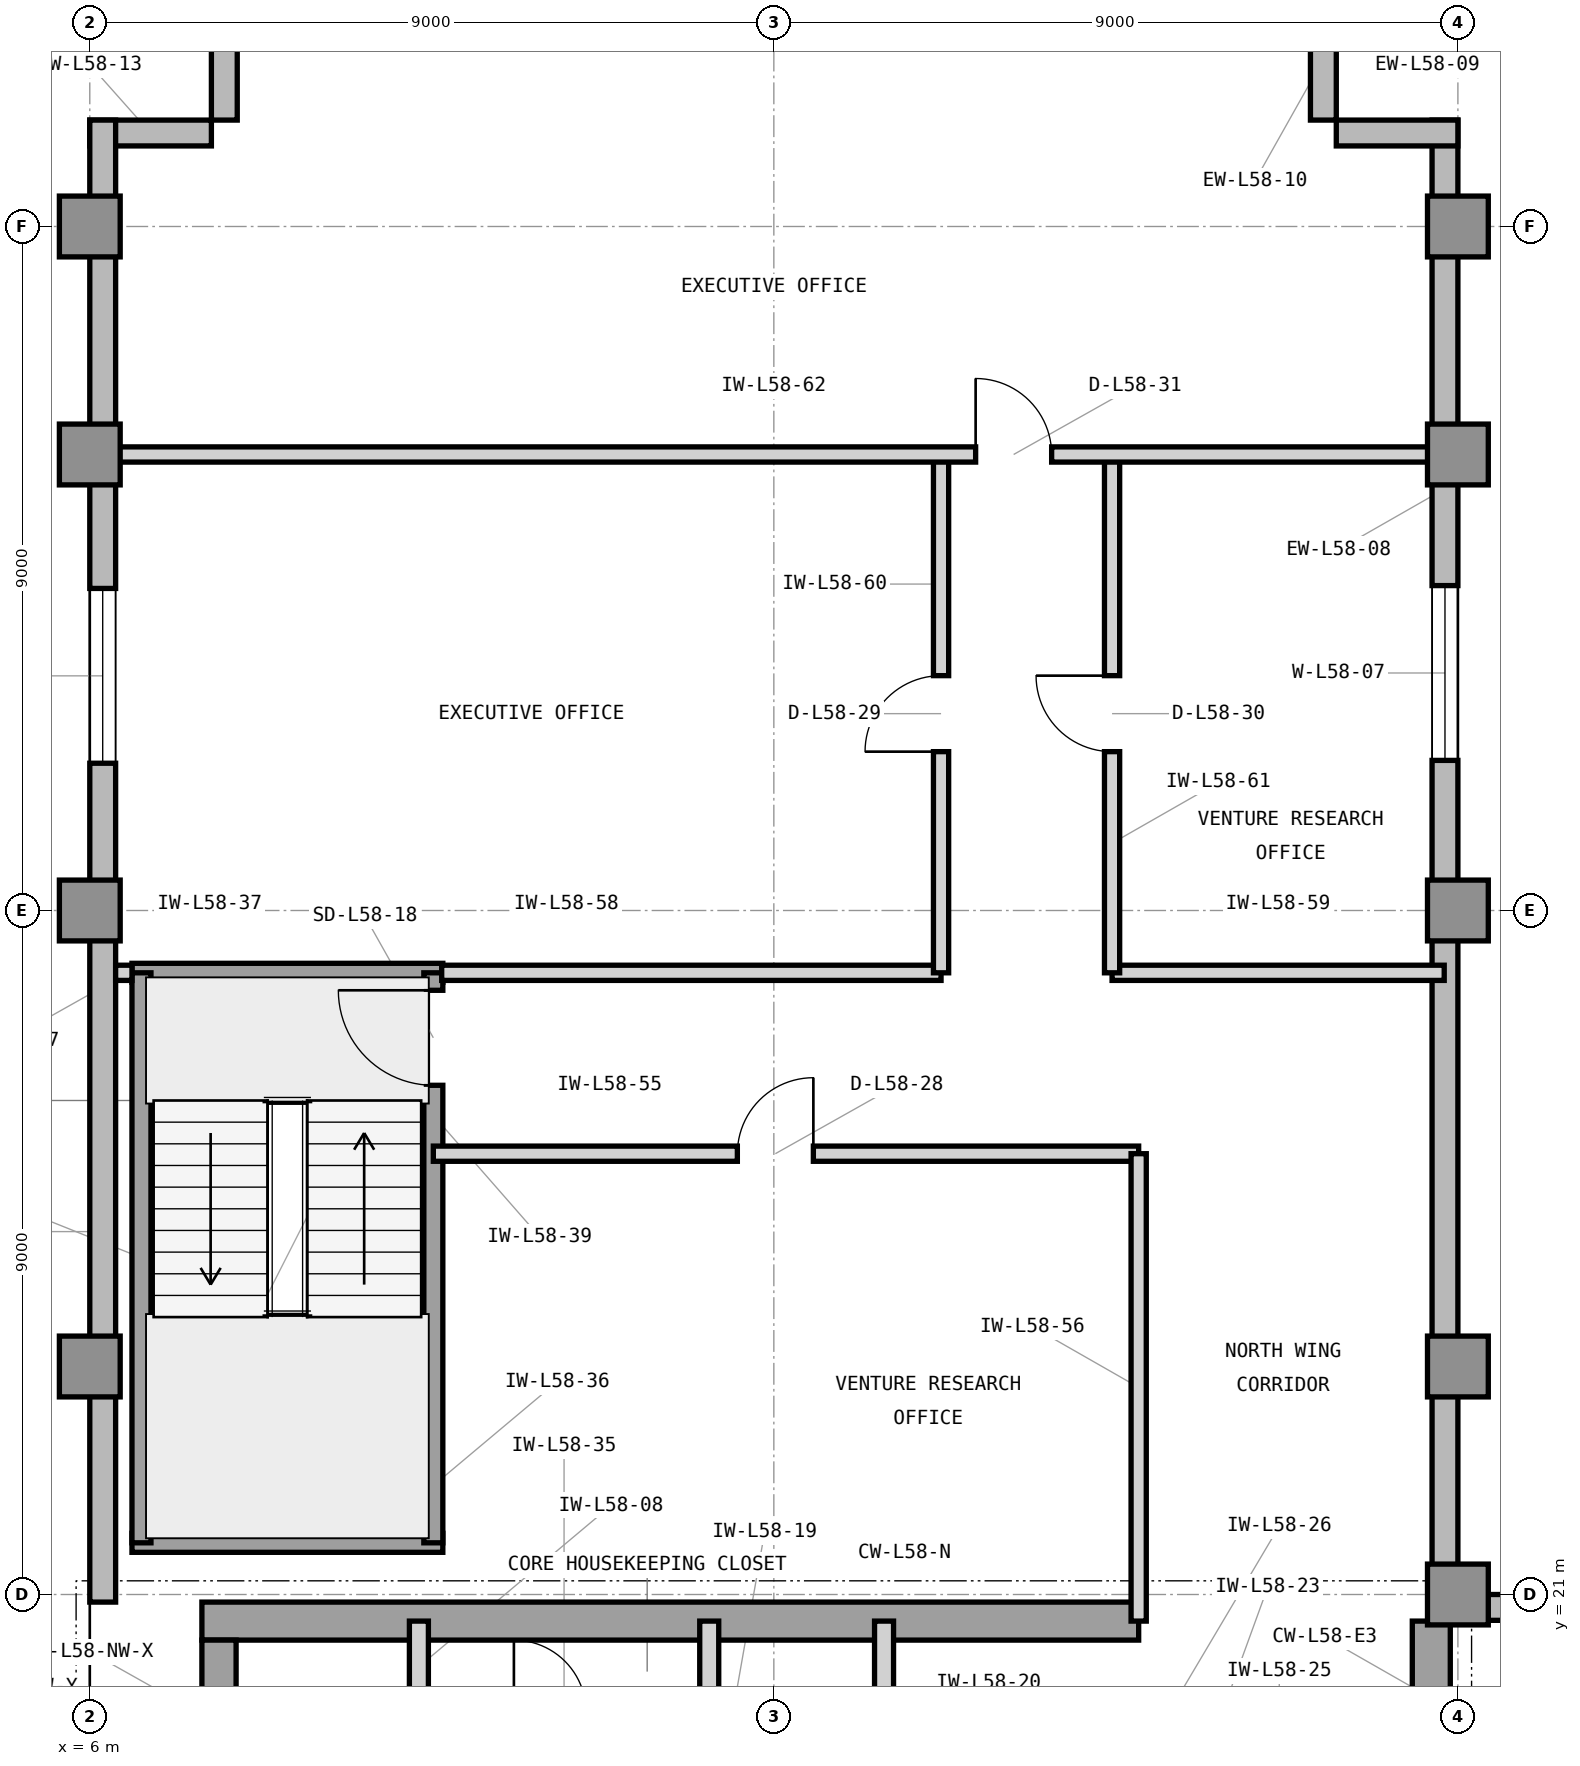
"""IFC4 building model, lengths in metres.
Left out: names, types, materials, properties, quantities, classifications, styles, units other than length and angle.
Written with IfcOpenShell. Run it as: python <this file> out.ifc"""

import sys

from ifc_helpers import new_model, si_unit, direction, frame, frame_2d, origin, origin_2d, place, context, subcontext, project, spatial, rectangle, extrude, element, fill, save


model = new_model("IFC4")
c1 = context("Model", 3, precision=1e-05, world=origin(), true_north=direction((0.0, 1.0)))
c2 = subcontext(c1, "Body", "Model", "MODEL_VIEW")
j1 = project(units=[si_unit("LENGTHUNIT", "METRE"), si_unit("PLANEANGLEUNIT", "RADIAN")], contexts=[c1])
p1 = place(None, origin())
s1 = spatial("IfcSite", under=j1, at=p1, CompositionType="ELEMENT")
p2 = place(p1, origin())
s2 = spatial("IfcBuilding", under=s1, at=p2, CompositionType="ELEMENT")
p3 = place(p2, frame((0.0, 0.0, 239.1)))
s3 = spatial("IfcBuildingStorey", under=s2, at=p3, CompositionType="ELEMENT", Elevation=239.1)
p4 = place(p3, frame((7.475, 20.65, 0.0), z_axis=(0.0, 0.0, 1.0), x_axis=(1.0, 0.0, 0.0)))
e1 = element("IfcWall", 1, at=p4, inside=s3, PredefinedType="SHEAR", context=c2, shape_type="SweptSolid", body=[
    extrude(rectangle(XDim=12.325, YDim=0.5, at=frame_2d((6.163, 0.0))), origin(), (0.0, 0.0, 1.0), 3.9),
])
p5 = place(p3, frame((23.65, 16.6, 0.0), z_axis=(0.0, 0.0, 1.0), x_axis=(0.0, 1.0, 0.0)))
e2 = element("IfcWall", 2, at=p5, inside=s3, PredefinedType="SHEAR", context=c2, shape_type="SweptSolid", body=[
    extrude(rectangle(XDim=4.05, YDim=0.5, at=frame_2d((2.025, 0.0))), origin(), (0.0, 0.0, 1.0), 3.9),
])
p6 = place(p3, frame((7.7, 19.575, 0.0), z_axis=(0.0, 0.0, 1.0), x_axis=(0.0, 1.0, 0.0)))
e3 = element("IfcWall", 3, at=p6, inside=s3, PredefinedType="SHEAR", context=c2, shape_type="SweptSolid", body=[
    extrude(rectangle(XDim=0.825, YDim=0.45, at=frame_2d((0.413, 0.0))), origin(), (0.0, 0.0, 1.0), 3.9),
])
for number, where, z_axis, x_axis in (
    (4, (24.0, 21.0, 0.0), (0.0, 0.0, 1.0), (1.0, 0.0, 0.0)),
    (5, (6.0, 24.0, 0.0), (0.0, 0.0, 1.0), (1.0, 0.0, 0.0)),
    (6, (24.0, 24.0, 0.0), (0.0, 0.0, 1.0), (1.0, 0.0, 0.0)),
    (7, (6.0, 30.0, 0.0), (0.0, 0.0, 1.0), (1.0, 0.0, 0.0)),
    (8, (24.0, 30.0, 0.0), (0.0, 0.0, 1.0), (1.0, 0.0, 0.0)),
    (9, (6.0, 36.0, 0.0), (0.0, 0.0, 1.0), (1.0, 0.0, 0.0)),
    (10, (24.0, 36.0, 0.0), (0.0, 0.0, 1.0), (1.0, 0.0, 0.0)),
    (11, (6.0, 39.0, 0.0), (0.0, 0.0, 1.0), (1.0, 0.0, 0.0)),
    (12, (24.0, 39.0, 0.0), (0.0, 0.0, 1.0), (1.0, 0.0, 0.0)),
):
    element("IfcColumn", number, at=place(p3, frame(where, z_axis=z_axis, x_axis=x_axis)), inside=s3, PredefinedType="COLUMN", context=c2, shape_type="SweptSolid", body=[
        extrude(rectangle(XDim=0.8, YDim=0.8, at=origin_2d()), origin(), (0.0, 0.0, 1.0), 3.9),
    ])
p7 = place(p3, frame((52.4, 20.83, 0.0), z_axis=(0.0, 0.0, 1.0), x_axis=(-1.0, 0.0, 0.0)))
e13 = element("IfcWall", 13, at=p7, inside=s3, PredefinedType="STANDARD", context=c2, shape_type="SweptSolid", body=[
    extrude(rectangle(XDim=28.4, YDim=0.34, at=frame_2d((14.2, 0.0))), origin(), (0.0, 0.0, 1.0), 3.7),
])
p8 = place(p7, frame((5.95, 0.0, 0.9)))
e14 = element("IfcOpeningElement", 14, at=p8, cuts=e13, PredefinedType="OPENING", context=c2, shape_type="SweptSolid", body=[
    extrude(rectangle(XDim=2.3, YDim=2.2, at=frame_2d((1.15, 1.1))), frame((0.0, 0.18, 0.0), z_axis=(0.0, -1.0, 0.0), x_axis=(1.0, 0.0, 0.0)), (0.0, 0.0, 1.0), 0.36),
])
p9 = place(p7, frame((15.417, 0.0, 0.9)))
e15 = element("IfcOpeningElement", 15, at=p9, cuts=e13, PredefinedType="OPENING", context=c2, shape_type="SweptSolid", body=[
    extrude(rectangle(XDim=2.3, YDim=2.2, at=frame_2d((1.15, 1.1))), frame((0.0, 0.18, 0.0), z_axis=(0.0, -1.0, 0.0), x_axis=(1.0, 0.0, 0.0)), (0.0, 0.0, 1.0), 0.36),
])
p10 = place(p7, frame((26.096, 0.0, 0.9)))
e16 = element("IfcOpeningElement", 16, at=p10, cuts=e13, PredefinedType="OPENING", context=c2, shape_type="SweptSolid", body=[
    extrude(rectangle(XDim=1.6, YDim=2.2, at=frame_2d((0.8, 1.1))), frame((0.0, 0.18, 0.0), z_axis=(0.0, -1.0, 0.0), x_axis=(1.0, 0.0, 0.0)), (0.0, 0.0, 1.0), 0.36),
])
p11 = place(p3, frame((23.83, 21.0, 0.0), z_axis=(0.0, 0.0, 1.0), x_axis=(0.0, 1.0, 0.0)))
e17 = element("IfcWall", 17, at=p11, inside=s3, PredefinedType="STANDARD", context=c2, shape_type="SweptSolid", body=[
    extrude(rectangle(XDim=19.4, YDim=0.34, at=frame_2d((9.7, 0.0))), origin(), (0.0, 0.0, 1.0), 3.7),
])
p12 = place(p11, frame((10.975, 0.0, 0.9)))
e18 = element("IfcOpeningElement", 18, at=p12, cuts=e17, PredefinedType="OPENING", context=c2, shape_type="SweptSolid", body=[
    extrude(rectangle(XDim=2.3, YDim=2.2, at=frame_2d((1.15, 1.1))), frame((0.0, 0.18, 0.0), z_axis=(0.0, -1.0, 0.0), x_axis=(1.0, 0.0, 0.0)), (0.0, 0.0, 1.0), 0.36),
])
for number, where, z_axis, x_axis in (
    (19, (24.0, 40.23, 0.0), (0.0, 0.0, 1.0), (-1.0, 0.0, 0.0)),
    (20, (22.23, 40.4, 0.0), (0.0, 0.0, 1.0), (0.0, 1.0, 0.0)),
    (21, (7.77, 42.0, 0.0), (0.0, 0.0, 1.0), (0.0, -1.0, 0.0)),
    (22, (7.6, 40.23, 0.0), (0.0, 0.0, 1.0), (-1.0, 0.0, 0.0)),
):
    element("IfcWall", number, at=place(p3, frame(where, z_axis=z_axis, x_axis=x_axis)), inside=s3, PredefinedType="STANDARD", context=c2, shape_type="SweptSolid", body=[
        extrude(rectangle(XDim=1.6, YDim=0.34, at=frame_2d((0.8, 0.0))), origin(), (0.0, 0.0, 1.0), 3.7),
    ])
p13 = place(p3, frame((6.17, 40.4, 0.0), z_axis=(0.0, 0.0, 1.0), x_axis=(0.0, -1.0, 0.0)))
e23 = element("IfcWall", 23, at=p13, inside=s3, PredefinedType="STANDARD", context=c2, shape_type="SweptSolid", body=[
    extrude(rectangle(XDim=19.5, YDim=0.34, at=frame_2d((9.75, 0.0))), origin(), (0.0, 0.0, 1.0), 3.7),
])
p14 = place(p13, frame((6.163, 0.0, 0.9)))
e24 = element("IfcOpeningElement", 24, at=p14, cuts=e23, PredefinedType="OPENING", context=c2, shape_type="SweptSolid", body=[
    extrude(rectangle(XDim=2.3, YDim=2.2, at=frame_2d((1.15, 1.1))), frame((0.0, 0.18, 0.0), z_axis=(0.0, -1.0, 0.0), x_axis=(1.0, 0.0, 0.0)), (0.0, 0.0, 1.0), 0.36),
])
p15 = place(p3, frame((10.33, 19.45, 0.0), z_axis=(0.0, 0.0, 1.0), x_axis=(0.0, 1.0, 0.0)))
e25 = element("IfcWall", 25, at=p15, inside=s3, PredefinedType="PARTITIONING", context=c2, shape_type="SweptSolid", body=[
    extrude(rectangle(XDim=1.2, YDim=0.25, at=frame_2d((0.6, 0.0))), origin(), (0.0, 0.0, 1.0), 3.69),
])
for number, where, z_axis, x_axis in (
    (26, (14.15, 16.7, 0.0), (0.0, 0.0, 1.0), (0.0, 1.0, 0.0)),
    (27, (16.45, 16.7, 0.0), (0.0, 0.0, 1.0), (0.0, 1.0, 0.0)),
):
    element("IfcWall", number, at=place(p3, frame(where, z_axis=z_axis, x_axis=x_axis)), inside=s3, PredefinedType="PARTITIONING", context=c2, shape_type="SweptSolid", body=[
        extrude(rectangle(XDim=3.95, YDim=0.25, at=frame_2d((1.975, 0.0))), origin(), (0.0, 0.0, 1.0), 3.69),
    ])
for number, where, z_axis, x_axis in (
    (28, (6.555, 21.68, 0.0), (0.0, 0.0, 1.0), (1.0, 0.0, 0.0)),
    (29, (6.555, 29.18, 0.0), (0.0, 0.0, 1.0), (1.0, 0.0, 0.0)),
):
    element("IfcWall", number, at=place(p3, frame(where, z_axis=z_axis, x_axis=x_axis)), inside=s3, PredefinedType="SHEAR", context=c2, shape_type="SweptSolid", body=[
        extrude(rectangle(XDim=4.09, YDim=0.25, at=frame_2d((2.045, 0.0))), origin(), (0.0, 0.0, 1.0), 3.9),
    ])
p16 = place(p3, frame((6.68, 21.68, 0.0), z_axis=(0.0, 0.0, 1.0), x_axis=(0.0, 1.0, 0.0)))
e30 = element("IfcWall", 30, at=p16, inside=s3, PredefinedType="SHEAR", context=c2, shape_type="SweptSolid", body=[
    extrude(rectangle(XDim=7.5, YDim=0.25, at=frame_2d((3.75, 0.0))), origin(), (0.0, 0.0, 1.0), 3.9),
])
p17 = place(p3, frame((10.52, 21.68, 0.0), z_axis=(0.0, 0.0, 1.0), x_axis=(0.0, 1.0, 0.0)))
e31 = element("IfcWall", 31, at=p17, inside=s3, PredefinedType="SHEAR", context=c2, shape_type="SweptSolid", body=[
    extrude(rectangle(XDim=7.5, YDim=0.25, at=frame_2d((3.75, 0.0))), origin(), (0.0, 0.0, 1.0), 3.9),
])
p18 = place(p17, frame((6.02, 0.0, 0.0)))
e32 = element("IfcOpeningElement", 32, at=p18, cuts=e31, PredefinedType="OPENING", context=c2, shape_type="SweptSolid", body=[
    extrude(rectangle(XDim=1.25, YDim=2.2, at=frame_2d((0.625, 1.1))), frame((0.0, 0.135, 0.0), z_axis=(0.0, -1.0, 0.0), x_axis=(1.0, 0.0, 0.0)), (0.0, 0.0, 1.0), 0.27),
])
p19 = place(p3, frame((10.52, 26.8, 0.0), z_axis=(0.0, 0.0, 1.0), x_axis=(1.0, 0.0, 0.0)))
e33 = element("IfcWall", 33, at=p19, inside=s3, PredefinedType="PARTITIONING", context=c2, shape_type="SweptSolid", body=[
    extrude(rectangle(XDim=9.28, YDim=0.2, at=frame_2d((4.64, 0.0))), origin(), (0.0, 0.0, 1.0), 3.69),
])
p20 = place(p19, frame((4.0, 0.0, 0.0)))
e34 = element("IfcOpeningElement", 34, at=p20, cuts=e33, PredefinedType="OPENING", context=c2, shape_type="SweptSolid", body=[
    extrude(rectangle(XDim=1.0, YDim=2.15, at=frame_2d((0.5, 1.075))), frame((0.0, 0.11, 0.0), z_axis=(0.0, -1.0, 0.0), x_axis=(1.0, 0.0, 0.0)), (0.0, 0.0, 1.0), 0.22),
])
p21 = place(p3, frame((19.8, 20.65, 0.0), z_axis=(0.0, 0.0, 1.0), x_axis=(0.0, 1.0, 0.0)))
e35 = element("IfcWall", 35, at=p21, inside=s3, PredefinedType="PARTITIONING", context=c2, shape_type="SweptSolid", body=[
    extrude(rectangle(XDim=6.15, YDim=0.2, at=frame_2d((3.075, 0.0))), origin(), (0.0, 0.0, 1.0), 3.69),
])
p22 = place(p3, frame((6.34, 29.18, 0.0), z_axis=(0.0, 0.0, 1.0), x_axis=(1.0, 0.0, 0.0)))
e36 = element("IfcWall", 36, at=p22, inside=s3, PredefinedType="PARTITIONING", context=c2, shape_type="SweptSolid", body=[
    extrude(rectangle(XDim=0.215, YDim=0.2, at=frame_2d((0.107, 0.0))), origin(), (0.0, 0.0, 1.0), 3.69),
])
p23 = place(p3, frame((10.63, 29.18, 0.0), z_axis=(0.0, 0.0, 1.0), x_axis=(1.0, 0.0, 0.0)))
e37 = element("IfcWall", 37, at=p23, inside=s3, PredefinedType="PARTITIONING", context=c2, shape_type="SweptSolid", body=[
    extrude(rectangle(XDim=6.57, YDim=0.2, at=frame_2d((3.285, 0.0))), origin(), (0.0, 0.0, 1.0), 3.69),
])
p24 = place(p3, frame((19.45, 29.18, 0.0), z_axis=(0.0, 0.0, 1.0), x_axis=(1.0, 0.0, 0.0)))
e38 = element("IfcWall", 38, at=p24, inside=s3, PredefinedType="PARTITIONING", context=c2, shape_type="SweptSolid", body=[
    extrude(rectangle(XDim=4.37, YDim=0.2, at=frame_2d((2.185, 0.0))), origin(), (0.0, 0.0, 1.0), 3.69),
])
p25 = place(p3, frame((17.2, 29.18, 0.0), z_axis=(0.0, 0.0, 1.0), x_axis=(0.0, 1.0, 0.0)))
e39 = element("IfcWall", 39, at=p25, inside=s3, PredefinedType="PARTITIONING", context=c2, shape_type="SweptSolid", body=[
    extrude(rectangle(XDim=6.82, YDim=0.2, at=frame_2d((3.41, 0.0))), origin(), (0.0, 0.0, 1.0), 3.69),
])
p26 = place(p25, frame((2.91, 0.0, 0.0)))
e40 = element("IfcOpeningElement", 40, at=p26, cuts=e39, PredefinedType="OPENING", context=c2, shape_type="SweptSolid", body=[
    extrude(rectangle(XDim=1.0, YDim=2.15, at=frame_2d((0.5, 1.075))), frame((0.0, 0.11, 0.0), z_axis=(0.0, -1.0, 0.0), x_axis=(1.0, 0.0, 0.0)), (0.0, 0.0, 1.0), 0.22),
])
p27 = place(p3, frame((19.45, 29.18, 0.0), z_axis=(0.0, 0.0, 1.0), x_axis=(0.0, 1.0, 0.0)))
e41 = element("IfcWall", 41, at=p27, inside=s3, PredefinedType="PARTITIONING", context=c2, shape_type="SweptSolid", body=[
    extrude(rectangle(XDim=6.82, YDim=0.2, at=frame_2d((3.41, 0.0))), origin(), (0.0, 0.0, 1.0), 3.69),
])
p28 = place(p27, frame((2.91, 0.0, 0.0)))
e42 = element("IfcOpeningElement", 42, at=p28, cuts=e41, PredefinedType="OPENING", context=c2, shape_type="SweptSolid", body=[
    extrude(rectangle(XDim=1.0, YDim=2.15, at=frame_2d((0.5, 1.075))), frame((0.0, 0.11, 0.0), z_axis=(0.0, -1.0, 0.0), x_axis=(1.0, 0.0, 0.0)), (0.0, 0.0, 1.0), 0.22),
])
p29 = place(p3, frame((6.18, 36.0, 0.0), z_axis=(0.0, 0.0, 1.0), x_axis=(1.0, 0.0, 0.0)))
e43 = element("IfcWall", 43, at=p29, inside=s3, PredefinedType="PARTITIONING", context=c2, shape_type="SweptSolid", body=[
    extrude(rectangle(XDim=17.64, YDim=0.2, at=frame_2d((8.82, 0.0))), origin(), (0.0, 0.0, 1.0), 3.073),
])
p30 = place(p29, frame((11.475, 0.0, 0.0)))
e44 = element("IfcOpeningElement", 44, at=p30, cuts=e43, PredefinedType="OPENING", context=c2, shape_type="SweptSolid", body=[
    extrude(rectangle(XDim=1.0, YDim=2.15, at=frame_2d((0.5, 1.075))), frame((0.0, 0.11, 0.0), z_axis=(0.0, -1.0, 0.0), x_axis=(1.0, 0.0, 0.0)), (0.0, 0.0, 1.0), 0.22),
])
p31 = place(p12, origin())
e45 = element("IfcWindow", 45, at=p31, inside=s3, PartitioningType="SINGLE_PANEL", PredefinedType="WINDOW", context=c2, shape_type="SweptSolid", body=[
    extrude(rectangle(XDim=2.3, YDim=2.2, at=frame_2d((1.15, 1.1))), frame((0.0, 0.11, 0.0), z_axis=(0.0, -1.0, 0.0), x_axis=(1.0, 0.0, 0.0)), (0.0, 0.0, 1.0), 0.06),
])
fill(e18, e45)
p32 = place(p14, origin())
e46 = element("IfcWindow", 46, at=p32, inside=s3, PartitioningType="SINGLE_PANEL", PredefinedType="WINDOW", context=c2, shape_type="SweptSolid", body=[
    extrude(rectangle(XDim=2.3, YDim=2.2, at=frame_2d((1.15, 1.1))), frame((0.0, 0.11, 0.0), z_axis=(0.0, -1.0, 0.0), x_axis=(1.0, 0.0, 0.0)), (0.0, 0.0, 1.0), 0.06),
])
fill(e24, e46)
p33 = place(p18, origin())
e47 = element("IfcDoor", 47, at=p33, inside=s3, OperationType="SINGLE_SWING_RIGHT", PredefinedType="DOOR", context=c2, shape_type="SweptSolid", body=[
    extrude(rectangle(XDim=1.25, YDim=2.2, at=frame_2d((0.625, 1.1))), frame((0.0, 0.025, 0.0), z_axis=(0.0, -1.0, 0.0), x_axis=(1.0, 0.0, 0.0)), (0.0, 0.0, 1.0), 0.05),
])
fill(e32, e47)
p34 = place(p20, origin())
e48 = element("IfcDoor", 48, at=p34, inside=s3, OperationType="SINGLE_SWING_RIGHT", PredefinedType="DOOR", context=c2, shape_type="SweptSolid", body=[
    extrude(rectangle(XDim=1.0, YDim=2.15, at=frame_2d((0.5, 1.075))), frame((0.0, 0.025, 0.0), z_axis=(0.0, -1.0, 0.0), x_axis=(1.0, 0.0, 0.0)), (0.0, 0.0, 1.0), 0.05),
])
fill(e34, e48)
p35 = place(p26, origin())
e49 = element("IfcDoor", 49, at=p35, inside=s3, OperationType="SINGLE_SWING_LEFT", PredefinedType="DOOR", context=c2, shape_type="SweptSolid", body=[
    extrude(rectangle(XDim=1.0, YDim=2.15, at=frame_2d((0.5, 1.075))), frame((0.0, 0.025, 0.0), z_axis=(0.0, -1.0, 0.0), x_axis=(1.0, 0.0, 0.0)), (0.0, 0.0, 1.0), 0.05),
])
fill(e40, e49)
p36 = place(p28, origin())
e50 = element("IfcDoor", 50, at=p36, inside=s3, OperationType="SINGLE_SWING_RIGHT", PredefinedType="DOOR", context=c2, shape_type="SweptSolid", body=[
    extrude(rectangle(XDim=1.0, YDim=2.15, at=frame_2d((0.5, 1.075))), frame((0.0, 0.025, 0.0), z_axis=(0.0, -1.0, 0.0), x_axis=(1.0, 0.0, 0.0)), (0.0, 0.0, 1.0), 0.05),
])
fill(e42, e50)
p37 = place(p30, origin())
e51 = element("IfcDoor", 51, at=p37, inside=s3, OperationType="SINGLE_SWING_LEFT", PredefinedType="DOOR", context=c2, shape_type="SweptSolid", body=[
    extrude(rectangle(XDim=1.0, YDim=2.15, at=frame_2d((0.5, 1.075))), frame((0.0, 0.025, 0.0), z_axis=(0.0, -1.0, 0.0), x_axis=(1.0, 0.0, 0.0)), (0.0, 0.0, 1.0), 0.05),
])
fill(e44, e51)
save(model, sys.argv[1])
